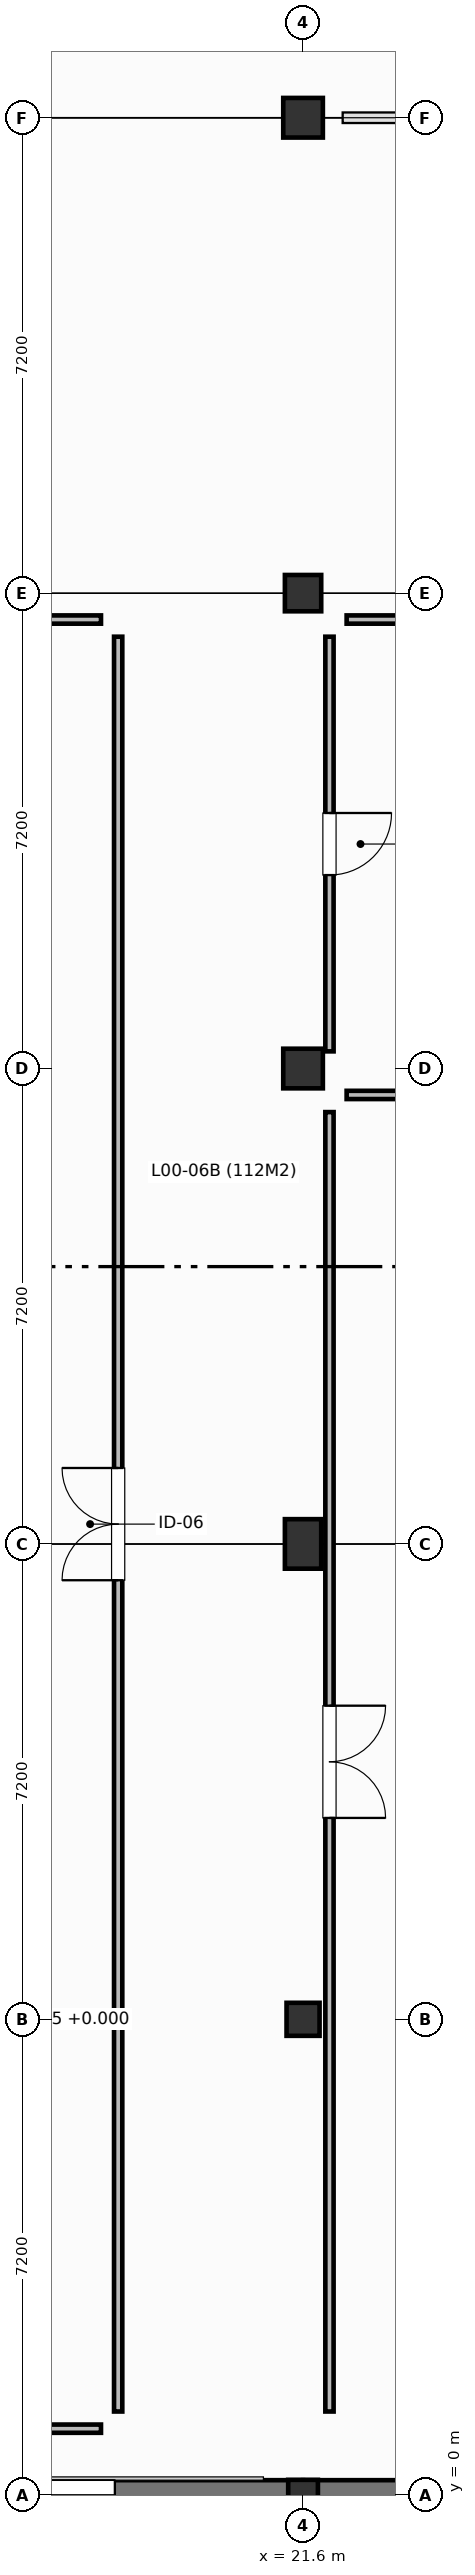
"""IFC4 building model, lengths in metres.
Left out: names, types, materials, properties, quantities, classifications, styles, units other than length and angle.
Written with IfcOpenShell. Run it as: python <this file> out.ifc"""

import sys

from ifc_helpers import new_model, si_unit, direction, frame, frame_2d, origin, origin_2d, place, context, subcontext, project, spatial, rectangle, extrude, element, fill, save


model = new_model("IFC4")
c1 = context("Model", 3, precision=1e-05, world=origin(), true_north=direction((0.0, 1.0)))
c2 = subcontext(c1, "Body", "Model", "MODEL_VIEW")
j1 = project(units=[si_unit("LENGTHUNIT", "METRE"), si_unit("PLANEANGLEUNIT", "RADIAN")], contexts=[c1])
p1 = place(None, origin())
s1 = spatial("IfcSite", under=j1, at=p1, CompositionType="ELEMENT")
p2 = place(p1, origin())
s2 = spatial("IfcBuilding", under=s1, at=p2, CompositionType="ELEMENT")
p3 = place(p2, origin())
s3 = spatial("IfcBuildingStorey", under=s2, at=p3, CompositionType="ELEMENT", Elevation=0.0)
p4 = place(p3, frame((21.6, 0.0, 0.0), z_axis=(0.0, 0.0, 1.0), x_axis=(1.0, 0.0, 0.0)))
e1 = element("IfcColumn", 1, at=p4, inside=s3, PredefinedType="COLUMN", context=c2, shape_type="SweptSolid", body=[
    extrude(rectangle(XDim=0.45, YDim=0.45, at=origin_2d()), origin(), (0.0, 0.0, 1.0), 4.8),
])
p5 = place(p3, frame((21.6, 7.2, 0.0), z_axis=(0.0, 0.0, 1.0), x_axis=(1.0, 0.0, 0.0)))
e2 = element("IfcColumn", 2, at=p5, inside=s3, PredefinedType="COLUMN", context=c2, shape_type="SweptSolid", body=[
    extrude(rectangle(XDim=0.5, YDim=0.5, at=origin_2d()), origin(), (0.0, 0.0, 1.0), 4.8),
])
p6 = place(p3, frame((21.6, 14.4, 0.0), z_axis=(0.0, 0.0, 1.0), x_axis=(1.0, 0.0, 0.0)))
e3 = element("IfcColumn", 3, at=p6, inside=s3, PredefinedType="COLUMN", context=c2, shape_type="SweptSolid", body=[
    extrude(rectangle(XDim=0.55, YDim=0.75, at=origin_2d()), origin(), (0.0, 0.0, 1.0), 4.8),
])
p7 = place(p3, frame((21.6, 21.6, 0.0), z_axis=(0.0, 0.0, 1.0), x_axis=(1.0, 0.0, 0.0)))
e4 = element("IfcColumn", 4, at=p7, inside=s3, PredefinedType="COLUMN", context=c2, shape_type="SweptSolid", body=[
    extrude(rectangle(XDim=0.6, YDim=0.6, at=origin_2d()), origin(), (0.0, 0.0, 1.0), 4.8),
])
p8 = place(p3, frame((21.6, 28.8, 0.0), z_axis=(0.0, 0.0, 1.0), x_axis=(1.0, 0.0, 0.0)))
e5 = element("IfcColumn", 5, at=p8, inside=s3, PredefinedType="COLUMN", context=c2, shape_type="SweptSolid", body=[
    extrude(rectangle(XDim=0.55, YDim=0.55, at=origin_2d()), origin(), (0.0, 0.0, 1.0), 4.8),
])
p9 = place(p3, frame((21.6, 36.0, 0.0), z_axis=(0.0, 0.0, 1.0), x_axis=(1.0, 0.0, 0.0)))
e6 = element("IfcColumn", 6, at=p9, inside=s3, PredefinedType="COLUMN", context=c2, shape_type="SweptSolid", body=[
    extrude(rectangle(XDim=0.6, YDim=0.6, at=origin_2d()), origin(), (0.0, 0.0, 1.0), 4.8),
])
p10 = place(p3, frame((28.8, 0.0, 0.0), z_axis=(0.0, 0.0, 1.0), x_axis=(-1.0, 0.0, 0.0)))
e7 = element("IfcWall", 7, at=p10, inside=s3, PredefinedType="STANDARD", context=c2, shape_type="SweptSolid", body=[
    extrude(rectangle(XDim=7.2, YDim=0.44, at=frame_2d((3.6, 0.0))), origin(), (0.0, 0.0, 1.0), 4.44),
])
p11 = place(p10, frame((3.0, 0.0, 0.8)))
e8 = element("IfcOpeningElement", 8, at=p11, cuts=e7, PredefinedType="OPENING", context=c2, shape_type="SweptSolid", body=[
    extrude(rectangle(XDim=1.2, YDim=1.65, at=frame_2d((0.6, 0.825))), frame((0.0, 0.23, 0.0), z_axis=(0.0, -1.0, 0.0), x_axis=(1.0, 0.0, 0.0)), (0.0, 0.0, 1.0), 0.46),
])
p12 = place(p3, frame((21.6, 0.0, 0.0), z_axis=(0.0, 0.0, 1.0), x_axis=(-1.0, 0.0, 0.0)))
e9 = element("IfcWall", 9, at=p12, inside=s3, PredefinedType="STANDARD", context=c2, shape_type="SweptSolid", body=[
    extrude(rectangle(XDim=7.2, YDim=0.44, at=frame_2d((3.6, 0.0))), origin(), (0.0, 0.0, 1.0), 4.44),
])
p13 = place(p12, frame((2.85, 0.0, 0.8)))
e10 = element("IfcOpeningElement", 10, at=p13, cuts=e9, PredefinedType="OPENING", context=c2, shape_type="SweptSolid", body=[
    extrude(rectangle(XDim=1.5, YDim=1.65, at=frame_2d((0.75, 0.825))), frame((0.0, 0.23, 0.0), z_axis=(0.0, -1.0, 0.0), x_axis=(1.0, 0.0, 0.0)), (0.0, 0.0, 1.0), 0.46),
])
p14 = place(p3, frame((1.26, 1.0, 0.0), z_axis=(0.0, 0.0, 1.0), x_axis=(1.0, 0.0, 0.0)))
e11 = element("IfcWall", 11, at=p14, inside=s3, PredefinedType="PARTITIONING", context=c2, shape_type="SweptSolid", body=[
    extrude(rectangle(XDim=17.28, YDim=0.125, at=frame_2d((8.64, 0.0))), origin(), (0.0, 0.0, 1.0), 4.44),
])
p15 = place(p3, frame((18.8, 1.26, 0.0), z_axis=(0.0, 0.0, 1.0), x_axis=(0.0, 1.0, 0.0)))
e12 = element("IfcWall", 12, at=p15, inside=s3, PredefinedType="PARTITIONING", context=c2, shape_type="SweptSolid", body=[
    extrude(rectangle(XDim=26.88, YDim=0.125, at=frame_2d((13.44, 0.0))), origin(), (0.0, 0.0, 1.0), 4.44),
])
p16 = place(p15, frame((12.59, 0.0, 0.0)))
e13 = element("IfcOpeningElement", 13, at=p16, cuts=e12, PredefinedType="OPENING", context=c2, shape_type="SweptSolid", body=[
    extrude(rectangle(XDim=1.7, YDim=2.2, at=frame_2d((0.85, 1.1))), frame((0.0, 0.073, 0.0), z_axis=(0.0, -1.0, 0.0), x_axis=(1.0, 0.0, 0.0)), (0.0, 0.0, 1.0), 0.145),
])
p17 = place(p3, frame((18.54, 28.4, 0.0), z_axis=(0.0, 0.0, 1.0), x_axis=(-1.0, 0.0, 0.0)))
e14 = element("IfcWall", 14, at=p17, inside=s3, PredefinedType="PARTITIONING", context=c2, shape_type="SweptSolid", body=[
    extrude(rectangle(XDim=17.28, YDim=0.125, at=frame_2d((8.64, 0.0))), origin(), (0.0, 0.0, 1.0), 3.615),
])
p18 = place(p3, frame((34.74, 21.2, 0.0), z_axis=(0.0, 0.0, 1.0), x_axis=(-1.0, 0.0, 0.0)))
e15 = element("IfcWall", 15, at=p18, inside=s3, PredefinedType="PARTITIONING", context=c2, shape_type="SweptSolid", body=[
    extrude(rectangle(XDim=12.48, YDim=0.125, at=frame_2d((6.24, 0.0))), origin(), (0.0, 0.0, 1.0), 3.515),
])
p19 = place(p3, frame((22.0, 20.94, 0.0), z_axis=(0.0, 0.0, 1.0), x_axis=(0.0, -1.0, 0.0)))
e16 = element("IfcWall", 16, at=p19, inside=s3, PredefinedType="PARTITIONING", context=c2, shape_type="SweptSolid", body=[
    extrude(rectangle(XDim=19.68, YDim=0.125, at=frame_2d((9.84, 0.0))), origin(), (0.0, 0.0, 1.0), 3.465),
])
p20 = place(p19, frame((8.99, 0.0, 0.0)))
e17 = element("IfcOpeningElement", 17, at=p20, cuts=e16, PredefinedType="OPENING", context=c2, shape_type="SweptSolid", body=[
    extrude(rectangle(XDim=1.7, YDim=2.2, at=frame_2d((0.85, 1.1))), frame((0.0, 0.073, 0.0), z_axis=(0.0, -1.0, 0.0), x_axis=(1.0, 0.0, 0.0)), (0.0, 0.0, 1.0), 0.145),
])
p21 = place(p3, frame((31.34, 28.4, 0.0), z_axis=(0.0, 0.0, 1.0), x_axis=(-1.0, 0.0, 0.0)))
e18 = element("IfcWall", 18, at=p21, inside=s3, PredefinedType="PARTITIONING", context=c2, shape_type="SweptSolid", body=[
    extrude(rectangle(XDim=9.08, YDim=0.125, at=frame_2d((4.54, 0.0))), origin(), (0.0, 0.0, 1.0), 3.515),
])
p22 = place(p3, frame((22.0, 28.14, 0.0), z_axis=(0.0, 0.0, 1.0), x_axis=(0.0, -1.0, 0.0)))
e19 = element("IfcWall", 19, at=p22, inside=s3, PredefinedType="PARTITIONING", context=c2, shape_type="SweptSolid", body=[
    extrude(rectangle(XDim=6.28, YDim=0.125, at=frame_2d((3.14, 0.0))), origin(), (0.0, 0.0, 1.0), 3.365),
])
p23 = place(p22, frame((2.67, 0.0, 0.0)))
e20 = element("IfcOpeningElement", 20, at=p23, cuts=e19, PredefinedType="OPENING", context=c2, shape_type="SweptSolid", body=[
    extrude(rectangle(XDim=0.94, YDim=2.1, at=frame_2d((0.47, 1.05))), frame((0.0, 0.073, 0.0), z_axis=(0.0, -1.0, 0.0), x_axis=(1.0, 0.0, 0.0)), (0.0, 0.0, 1.0), 0.145),
])
p24 = place(p13, origin())
e21 = element("IfcWindow", 21, at=p24, inside=s3, PartitioningType="SINGLE_PANEL", PredefinedType="WINDOW", context=c2, shape_type="SweptSolid", body=[
    extrude(rectangle(XDim=1.5, YDim=1.65, at=frame_2d((0.75, 0.825))), frame((0.0, 0.03, 0.0), z_axis=(0.0, -1.0, 0.0), x_axis=(1.0, 0.0, 0.0)), (0.0, 0.0, 1.0), 0.06),
])
fill(e10, e21)
p25 = place(p16, origin())
e22 = element("IfcDoor", 22, at=p25, inside=s3, OperationType="DOUBLE_DOOR_SINGLE_SWING", PredefinedType="DOOR", context=c2, shape_type="SweptSolid", body=[
    extrude(rectangle(XDim=1.7, YDim=2.2, at=frame_2d((0.85, 1.1))), frame((0.0, 0.025, 0.0), z_axis=(0.0, -1.0, 0.0), x_axis=(1.0, 0.0, 0.0)), (0.0, 0.0, 1.0), 0.05),
])
fill(e13, e22)
p26 = place(p20, origin())
e23 = element("IfcDoor", 23, at=p26, inside=s3, OperationType="DOUBLE_DOOR_SINGLE_SWING", PredefinedType="DOOR", context=c2, shape_type="SweptSolid", body=[
    extrude(rectangle(XDim=1.7, YDim=2.2, at=frame_2d((0.85, 1.1))), frame((0.0, 0.025, 0.0), z_axis=(0.0, -1.0, 0.0), x_axis=(1.0, 0.0, 0.0)), (0.0, 0.0, 1.0), 0.05),
])
fill(e17, e23)
p27 = place(p23, origin())
e24 = element("IfcDoor", 24, at=p27, inside=s3, OperationType="SINGLE_SWING_LEFT", PredefinedType="DOOR", context=c2, shape_type="SweptSolid", body=[
    extrude(rectangle(XDim=0.94, YDim=2.1, at=frame_2d((0.47, 1.05))), frame((0.0, 0.025, 0.0), z_axis=(0.0, -1.0, 0.0), x_axis=(1.0, 0.0, 0.0)), (0.0, 0.0, 1.0), 0.05),
])
fill(e20, e24)
save(model, sys.argv[1])
